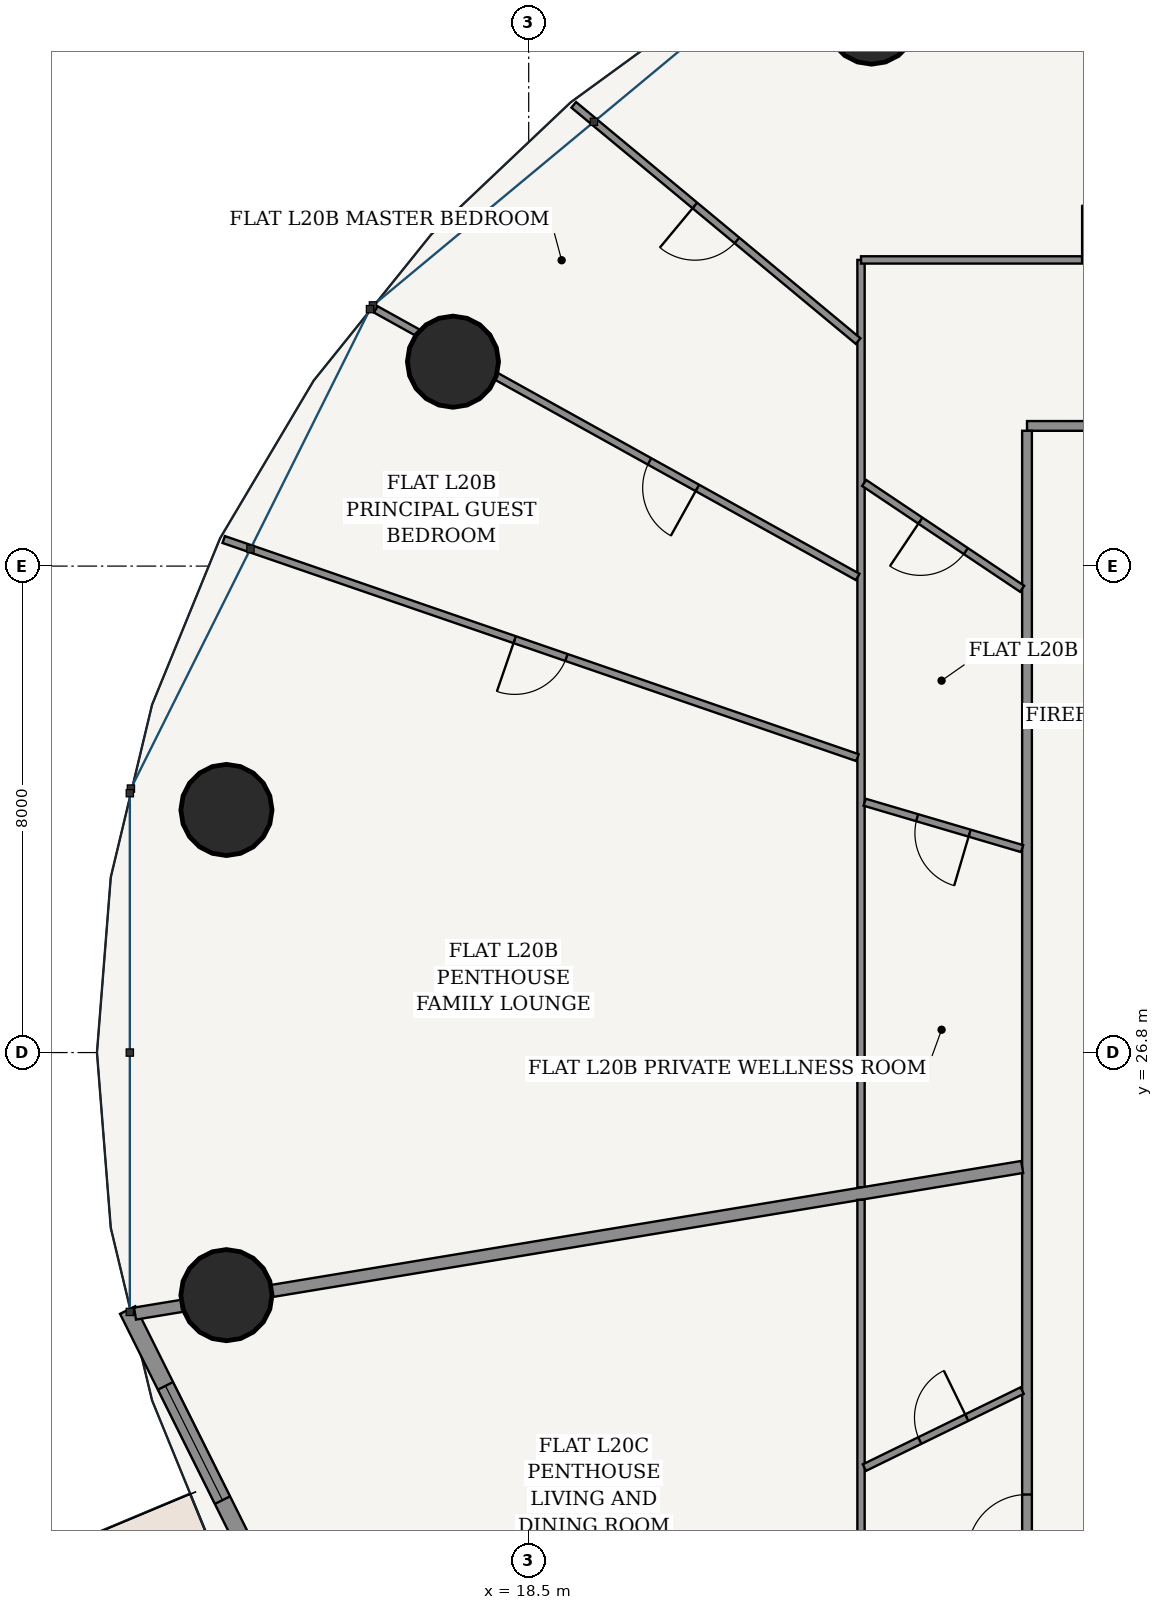
"""IFC4 building model, lengths in metres.
Left out: names, types, materials, properties, quantities, classifications, styles, units other than length and angle.
Written with IfcOpenShell. Run it as: python <this file> out.ifc"""

import sys

from ifc_helpers import new_model, si_unit, direction, frame, frame_2d, origin, origin_2d, place, context, subcontext, project, spatial, rectangle, hollow_circle, extrude, source, transform, mapped, element, fill, save


model = new_model("IFC4")
c1 = context("Model", 3, precision=1e-05, world=origin(), true_north=direction((-0.2419218956, 0.970295726276)))
c2 = subcontext(c1, "Body", "Model", "MODEL_VIEW")
j1 = project(units=[si_unit("LENGTHUNIT", "METRE"), si_unit("PLANEANGLEUNIT", "RADIAN")], contexts=[c1])
p1 = place(None, origin())
s1 = spatial("IfcSite", under=j1, at=p1, CompositionType="ELEMENT")
p2 = place(p1, origin())
s2 = spatial("IfcBuilding", under=s1, at=p2, CompositionType="ELEMENT")
p3 = place(p2, frame((0.0, 0.0, 79.8)))
s3 = spatial("IfcBuildingStorey", under=s2, at=p3, CompositionType="ELEMENT", Elevation=79.8)
for number, where, z_axis, x_axis in (
    (1, (24.138, 43.803, 0.0), (0.0, 0.0, 1.0), (1.0, 0.0, 0.0)),
    (2, (17.255, 38.161, 0.0), (0.0, 0.0, 1.0), (1.0, 0.0, 0.0)),
    (3, (13.529, 30.79, 0.0), (0.0, 0.0, 1.0), (1.0, 0.0, 0.0)),
    (4, (13.529, 22.81, 0.0), (0.0, 0.0, 1.0), (1.0, 0.0, 0.0)),
):
    element("IfcColumn", number, at=place(p3, frame(where, z_axis=z_axis, x_axis=x_axis)), inside=s3, PredefinedType="COLUMN", context=c2, shape_type="SweptSolid", body=[
        extrude(hollow_circle(Radius=0.75, WallThickness=0.045, at=origin_2d()), origin(), (0.0, 0.0, 1.0), 3.6),
    ])
p4 = place(p3, frame((11.905, 22.566, 0.0), z_axis=(0.0, 0.0, 1.0), x_axis=(0.446274562077, -0.894896091869, 0.0)))
e5 = element("IfcWall", 5, at=p4, inside=s3, PredefinedType="SOLIDWALL", context=c2, shape_type="SweptSolid", body=[
    extrude(rectangle(XDim=9.05, YDim=0.28, at=frame_2d((4.525, 0.0))), origin(), (0.0, 0.0, 1.0), 3.325),
])
p5 = place(p4, frame((1.394, 0.0, 0.85)))
e6 = element("IfcOpeningElement", 6, at=p5, cuts=e5, PredefinedType="OPENING", context=c2, shape_type="SweptSolid", body=[
    extrude(rectangle(XDim=2.1, YDim=1.95, at=frame_2d((1.05, 0.975))), frame((0.0, 0.15, 0.0), z_axis=(0.0, -1.0, 0.0), x_axis=(1.0, 0.0, 0.0)), (0.0, 0.0, 1.0), 0.3),
])
p6 = place(p4, frame((5.557, 0.0, 0.85)))
e7 = element("IfcOpeningElement", 7, at=p6, cuts=e5, PredefinedType="OPENING", context=c2, shape_type="SweptSolid", body=[
    extrude(rectangle(XDim=2.1, YDim=1.95, at=frame_2d((1.05, 0.975))), frame((0.0, 0.15, 0.0), z_axis=(0.0, -1.0, 0.0), x_axis=(1.0, 0.0, 0.0)), (0.0, 0.0, 1.0), 0.3),
])
p7 = place(p3, frame((26.695, 37.105, 0.0), z_axis=(0.0, 0.0, 1.0), x_axis=(1.0, 0.0, 0.0)))
e8 = element("IfcWall", 8, at=p7, inside=s3, PredefinedType="PARTITIONING", context=c2, shape_type="SweptSolid", body=[
    extrude(rectangle(XDim=22.61, YDim=0.16, at=frame_2d((11.305, 0.0))), origin(), (0.0, 0.0, 1.0), 2.767),
])
p8 = place(p7, frame((18.812, 0.0, 0.0)))
e9 = element("IfcOpeningElement", 9, at=p8, cuts=e8, PredefinedType="OPENING", context=c2, shape_type="SweptSolid", body=[
    extrude(rectangle(XDim=0.98, YDim=2.2, at=frame_2d((0.49, 1.1))), frame((0.0, 0.09, 0.0), z_axis=(0.0, -1.0, 0.0), x_axis=(1.0, 0.0, 0.0)), (0.0, 0.0, 1.0), 0.18),
])
p9 = place(p7, frame((2.823, 0.0, 0.0)))
e10 = element("IfcOpeningElement", 10, at=p9, cuts=e8, PredefinedType="OPENING", context=c2, shape_type="SweptSolid", body=[
    extrude(rectangle(XDim=0.98, YDim=2.2, at=frame_2d((0.49, 1.1))), frame((0.0, 0.09, 0.0), z_axis=(0.0, -1.0, 0.0), x_axis=(1.0, 0.0, 0.0)), (0.0, 0.0, 1.0), 0.18),
])
p10 = place(p3, frame((26.695, 16.575, 0.0), z_axis=(0.0, 0.0, 1.0), x_axis=(0.0, 1.0, 0.0)))
e11 = element("IfcWall", 11, at=p10, inside=s3, PredefinedType="PARTITIONING", context=c2, shape_type="SweptSolid", body=[
    extrude(rectangle(XDim=20.45, YDim=0.16, at=frame_2d((10.225, 0.0))), origin(), (0.0, 0.0, 1.0), 2.767),
])
p11 = place(p10, frame((1.977, 0.0, 0.0)))
e12 = element("IfcOpeningElement", 12, at=p11, cuts=e11, PredefinedType="OPENING", context=c2, shape_type="SweptSolid", body=[
    extrude(rectangle(XDim=0.98, YDim=2.2, at=frame_2d((0.49, 1.1))), frame((0.0, 0.09, 0.0), z_axis=(0.0, -1.0, 0.0), x_axis=(1.0, 0.0, 0.0)), (0.0, 0.0, 1.0), 0.18),
])
p12 = place(p3, frame((23.965, 24.583, 0.0), z_axis=(0.0, 0.0, 1.0), x_axis=(0.0, 1.0, 0.0)))
e13 = element("IfcWall", 13, at=p12, inside=s3, PredefinedType="PARTITIONING", context=c2, shape_type="SweptSolid", body=[
    extrude(rectangle(XDim=15.252, YDim=0.12, at=frame_2d((7.626, 0.0))), origin(), (0.0, 0.0, 1.0), 2.767),
])
p13 = place(p3, frame((23.965, 39.835, 0.0), z_axis=(0.0, 0.0, 1.0), x_axis=(1.0, 0.0, 0.0)))
e14 = element("IfcWall", 14, at=p13, inside=s3, PredefinedType="PARTITIONING", context=c2, shape_type="SweptSolid", body=[
    extrude(rectangle(XDim=13.933, YDim=0.12, at=frame_2d((6.966, 0.0))), origin(), (0.0, 0.0, 1.0), 2.767),
])
p14 = place(p13, frame((3.636, 0.0, 0.0)))
e15 = element("IfcOpeningElement", 15, at=p14, cuts=e14, PredefinedType="OPENING", context=c2, shape_type="SweptSolid", body=[
    extrude(rectangle(XDim=0.9, YDim=2.15, at=frame_2d((0.45, 1.075))), frame((0.0, 0.07, 0.0), z_axis=(0.0, -1.0, 0.0), x_axis=(1.0, 0.0, 0.0)), (0.0, 0.0, 1.0), 0.14),
])
p15 = place(p3, frame((23.917, 38.5, 0.0), z_axis=(0.0, 0.0, 1.0), x_axis=(-0.769161827891, 0.63905405289, 0.0)))
e16 = element("IfcWall", 16, at=p15, inside=s3, PredefinedType="PARTITIONING", context=c2, shape_type="SweptSolid", body=[
    extrude(rectangle(XDim=6.08, YDim=0.12, at=frame_2d((3.04, 0.0))), origin(), (0.0, 0.0, 1.0), 2.767),
])
p16 = place(p15, frame((2.59, 0.0, 0.0)))
e17 = element("IfcOpeningElement", 17, at=p16, cuts=e16, PredefinedType="OPENING", context=c2, shape_type="SweptSolid", body=[
    extrude(rectangle(XDim=0.9, YDim=2.15, at=frame_2d((0.45, 1.075))), frame((0.0, 0.07, 0.0), z_axis=(0.0, -1.0, 0.0), x_axis=(1.0, 0.0, 0.0)), (0.0, 0.0, 1.0), 0.14),
])
p17 = place(p3, frame((23.911, 34.622, 0.0), z_axis=(0.0, 0.0, 1.0), x_axis=(-0.874324904351, 0.485341077626, 0.0)))
e18 = element("IfcWall", 18, at=p17, inside=s3, PredefinedType="PARTITIONING", context=c2, shape_type="SweptSolid", body=[
    extrude(rectangle(XDim=9.066, YDim=0.12, at=frame_2d((4.533, 0.0))), origin(), (0.0, 0.0, 1.0), 2.767),
])
p18 = place(p17, frame((3.016, 0.0, 0.0)))
e19 = element("IfcOpeningElement", 19, at=p18, cuts=e18, PredefinedType="OPENING", context=c2, shape_type="SweptSolid", body=[
    extrude(rectangle(XDim=0.9, YDim=2.15, at=frame_2d((0.45, 1.075))), frame((0.0, 0.07, 0.0), z_axis=(0.0, -1.0, 0.0), x_axis=(1.0, 0.0, 0.0)), (0.0, 0.0, 1.0), 0.14),
])
p19 = place(p3, frame((23.906, 31.65, 0.0), z_axis=(0.0, 0.0, 1.0), x_axis=(-0.945573120726, 0.32540970078, 0.0)))
e20 = element("IfcWall", 20, at=p19, inside=s3, PredefinedType="PARTITIONING", context=c2, shape_type="SweptSolid", body=[
    extrude(rectangle(XDim=11.022, YDim=0.12, at=frame_2d((5.511, 0.0))), origin(), (0.0, 0.0, 1.0), 2.767),
])
p20 = place(p19, frame((5.061, 0.0, 0.0)))
e21 = element("IfcOpeningElement", 21, at=p20, cuts=e20, PredefinedType="OPENING", context=c2, shape_type="SweptSolid", body=[
    extrude(rectangle(XDim=0.9, YDim=2.15, at=frame_2d((0.45, 1.075))), frame((0.0, 0.07, 0.0), z_axis=(0.0, -1.0, 0.0), x_axis=(1.0, 0.0, 0.0)), (0.0, 0.0, 1.0), 0.14),
])
p21 = place(p3, frame((26.615, 34.427, 0.0), z_axis=(0.0, 0.0, 1.0), x_axis=(-0.830799215213, 0.556572245088, 0.0)))
e22 = element("IfcWall", 22, at=p21, inside=s3, PredefinedType="PARTITIONING", context=c2, shape_type="SweptSolid", body=[
    extrude(rectangle(XDim=3.128, YDim=0.12, at=frame_2d((1.564, 0.0))), origin(), (0.0, 0.0, 1.0), 3.004),
])
p22 = place(p21, frame((1.114, 0.0, 0.0)))
e23 = element("IfcOpeningElement", 23, at=p22, cuts=e22, PredefinedType="OPENING", context=c2, shape_type="SweptSolid", body=[
    extrude(rectangle(XDim=0.9, YDim=2.15, at=frame_2d((0.45, 1.075))), frame((0.0, 0.07, 0.0), z_axis=(0.0, -1.0, 0.0), x_axis=(1.0, 0.0, 0.0)), (0.0, 0.0, 1.0), 0.14),
])
p23 = place(p3, frame((26.615, 30.154, 0.0), z_axis=(0.0, 0.0, 1.0), x_axis=(-0.959264672883, 0.282508915537, 0.0)))
e24 = element("IfcWall", 24, at=p23, inside=s3, PredefinedType="PARTITIONING", context=c2, shape_type="SweptSolid", body=[
    extrude(rectangle(XDim=2.701, YDim=0.12, at=frame_2d((1.35, 0.0))), origin(), (0.0, 0.0, 1.0), 3.325),
])
p24 = place(p23, frame((0.9, 0.0, 0.0)))
e25 = element("IfcOpeningElement", 25, at=p24, cuts=e24, PredefinedType="OPENING", context=c2, shape_type="SweptSolid", body=[
    extrude(rectangle(XDim=0.9, YDim=2.15, at=frame_2d((0.45, 1.075))), frame((0.0, 0.07, 0.0), z_axis=(0.0, -1.0, 0.0), x_axis=(1.0, 0.0, 0.0)), (0.0, 0.0, 1.0), 0.14),
])
p25 = place(p3, frame((26.615, 24.918, 0.0), z_axis=(0.0, 0.0, 1.0), x_axis=(-0.986618789677, -0.163044054958, 0.0)))
e26 = element("IfcWall", 26, at=p25, inside=s3, PredefinedType="PARTITIONING", context=c2, shape_type="SweptSolid", body=[
    extrude(rectangle(XDim=14.787, YDim=0.2, at=frame_2d((7.393, 0.0))), origin(), (0.0, 0.0, 1.0), 2.767),
])
p26 = place(p3, frame((23.965, 13.765, 0.0), z_axis=(0.0, 0.0, 1.0), x_axis=(0.0, 1.0, 0.0)))
e27 = element("IfcWall", 27, at=p26, inside=s3, PredefinedType="PARTITIONING", context=c2, shape_type="SweptSolid", body=[
    extrude(rectangle(XDim=10.614, YDim=0.12, at=frame_2d((5.307, 0.0))), origin(), (0.0, 0.0, 1.0), 2.767),
])
p27 = place(p26, frame((2.815, 0.0, 0.0)))
e28 = element("IfcOpeningElement", 28, at=p27, cuts=e27, PredefinedType="OPENING", context=c2, shape_type="SweptSolid", body=[
    extrude(rectangle(XDim=0.9, YDim=2.15, at=frame_2d((0.45, 1.075))), frame((0.0, 0.07, 0.0), z_axis=(0.0, -1.0, 0.0), x_axis=(1.0, 0.0, 0.0)), (0.0, 0.0, 1.0), 0.14),
])
p28 = place(p3, frame((26.615, 21.241, 0.0), z_axis=(0.0, 0.0, 1.0), x_axis=(-0.898615592274, -0.438736842906, 0.0)))
e29 = element("IfcWall", 29, at=p28, inside=s3, PredefinedType="PARTITIONING", context=c2, shape_type="SweptSolid", body=[
    extrude(rectangle(XDim=2.887, YDim=0.12, at=frame_2d((1.443, 0.0))), origin(), (0.0, 0.0, 1.0), 3.325),
])
p29 = place(p28, frame((1.013, 0.0, 0.0)))
e30 = element("IfcOpeningElement", 30, at=p29, cuts=e29, PredefinedType="OPENING", context=c2, shape_type="SweptSolid", body=[
    extrude(rectangle(XDim=0.86, YDim=2.15, at=frame_2d((0.43, 1.075))), frame((0.0, 0.07, 0.0), z_axis=(0.0, -1.0, 0.0), x_axis=(1.0, 0.0, 0.0)), (0.0, 0.0, 1.0), 0.14),
])
m1 = source(origin(), c2, "Body", "SweptSolid", [
    extrude(rectangle(XDim=2.1, YDim=1.95, at=frame_2d((1.05, 0.975))), frame((0.0, 0.03, 0.0), z_axis=(0.0, -1.0, 0.0), x_axis=(1.0, 0.0, 0.0)), (0.0, 0.0, 1.0), 0.06),
])
p30 = place(p5, origin())
e31 = element("IfcWindow", 31, at=p30, inside=s3, PartitioningType="SINGLE_PANEL", PredefinedType="WINDOW", context=c2, shape_type="MappedRepresentation", body=[
    mapped(m1, transform((0.0, 0.0, 0.0), scale=1.0)),
])
fill(e6, e31)
m2 = source(origin(), c2, "Body", "SweptSolid", [
    extrude(rectangle(XDim=0.9, YDim=2.15, at=frame_2d((0.45, 1.075))), frame((0.0, 0.025, 0.0), z_axis=(0.0, -1.0, 0.0), x_axis=(1.0, 0.0, 0.0)), (0.0, 0.0, 1.0), 0.05),
])
p31 = place(p14, origin())
e32 = element("IfcDoor", 32, at=p31, inside=s3, OperationType="SINGLE_SWING_LEFT", PredefinedType="DOOR", context=c2, shape_type="MappedRepresentation", body=[
    mapped(m2, transform((0.0, 0.0, 0.0), scale=1.0)),
])
fill(e15, e32)
p32 = place(p22, origin())
e33 = element("IfcDoor", 33, at=p32, inside=s3, OperationType="SINGLE_SWING_RIGHT", PredefinedType="DOOR", context=c2, shape_type="MappedRepresentation", body=[
    mapped(m2, transform((0.0, 0.0, 0.0), scale=1.0)),
])
fill(e23, e33)
p33 = place(p24, origin())
e34 = element("IfcDoor", 34, at=p33, inside=s3, OperationType="SINGLE_SWING_LEFT", PredefinedType="DOOR", context=c2, shape_type="MappedRepresentation", body=[
    mapped(m2, transform((0.0, 0.0, 0.0), scale=1.0)),
])
fill(e25, e34)
p34 = place(p16, origin())
e35 = element("IfcDoor", 35, at=p34, inside=s3, OperationType="SINGLE_SWING_RIGHT", PredefinedType="DOOR", context=c2, shape_type="MappedRepresentation", body=[
    mapped(m2, transform((0.0, 0.0, 0.0), scale=1.0)),
])
fill(e17, e35)
p35 = place(p18, origin())
e36 = element("IfcDoor", 36, at=p35, inside=s3, OperationType="SINGLE_SWING_LEFT", PredefinedType="DOOR", context=c2, shape_type="MappedRepresentation", body=[
    mapped(m2, transform((0.0, 0.0, 0.0), scale=1.0)),
])
fill(e19, e36)
p36 = place(p20, origin())
e37 = element("IfcDoor", 37, at=p36, inside=s3, OperationType="SINGLE_SWING_RIGHT", PredefinedType="DOOR", context=c2, shape_type="MappedRepresentation", body=[
    mapped(m2, transform((0.0, 0.0, 0.0), scale=1.0)),
])
fill(e21, e37)
m3 = source(origin(), c2, "Body", "SweptSolid", [
    extrude(rectangle(XDim=0.98, YDim=2.2, at=frame_2d((0.49, 1.1))), frame((0.0, 0.025, 0.0), z_axis=(0.0, -1.0, 0.0), x_axis=(1.0, 0.0, 0.0)), (0.0, 0.0, 1.0), 0.05),
])
p37 = place(p11, origin())
e38 = element("IfcDoor", 38, at=p37, inside=s3, OperationType="SINGLE_SWING_LEFT", PredefinedType="DOOR", context=c2, shape_type="MappedRepresentation", body=[
    mapped(m3, transform((0.0, 0.0, 0.0), scale=1.0)),
])
fill(e12, e38)
m4 = source(origin(), c2, "Body", "SweptSolid", [
    extrude(rectangle(XDim=0.86, YDim=2.15, at=frame_2d((0.43, 1.075))), frame((0.0, 0.025, 0.0), z_axis=(0.0, -1.0, 0.0), x_axis=(1.0, 0.0, 0.0)), (0.0, 0.0, 1.0), 0.05),
])
p38 = place(p29, frame((0.86, 0.0, 0.0), z_axis=(0.0, 0.0, 1.0), x_axis=(-1.0, 0.0, 0.0)))
e39 = element("IfcDoor", 39, at=p38, inside=s3, OperationType="SINGLE_SWING_RIGHT", PredefinedType="DOOR", context=c2, shape_type="MappedRepresentation", body=[
    mapped(m4, transform((0.0, 0.0, 0.0), scale=1.0)),
])
fill(e30, e39)
save(model, sys.argv[1])
